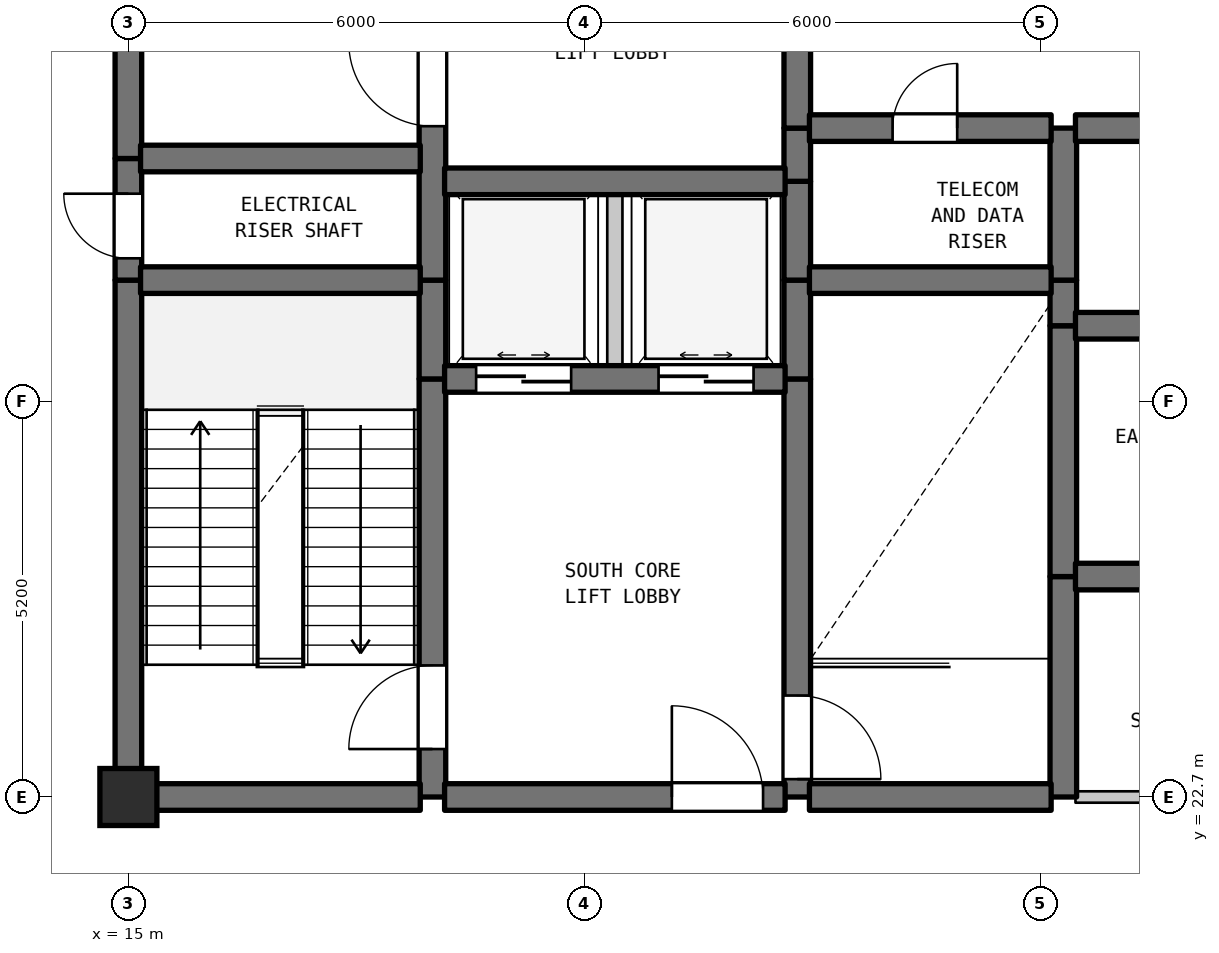
"""IFC4 building model, lengths in metres.
Left out: names, types, materials, properties, quantities, classifications, styles, units other than length and angle.
Written with IfcOpenShell. Run it as: python <this file> out.ifc"""

import sys

from ifc_helpers import new_model, si_unit, direction, frame, frame_2d, origin, origin_2d, place, context, subcontext, project, spatial, rectangle, extrude, element, fill, save


model = new_model("IFC4")
c1 = context("Model", 3, precision=1e-05, world=origin(), true_north=direction((0.0, 1.0)))
c2 = subcontext(c1, "Body", "Model", "MODEL_VIEW")
j1 = project(units=[si_unit("LENGTHUNIT", "METRE"), si_unit("PLANEANGLEUNIT", "RADIAN")], contexts=[c1])
p1 = place(None, origin())
s1 = spatial("IfcSite", under=j1, at=p1, CompositionType="ELEMENT")
p2 = place(p1, origin())
s2 = spatial("IfcBuilding", under=s1, at=p2, CompositionType="ELEMENT")
p3 = place(p2, frame((0.0, 0.0, 237.6)))
s3 = spatial("IfcBuildingStorey", under=s2, at=p3, CompositionType="ELEMENT", Elevation=237.6)
p4 = place(p3, frame((15.0, 22.7, 0.0), z_axis=(0.0, 0.0, 1.0), x_axis=(1.0, 0.0, 0.0)))
e1 = element("IfcColumn", 1, at=p4, inside=s3, PredefinedType="COLUMN", context=c2, shape_type="SweptSolid", body=[
    extrude(rectangle(XDim=0.75, YDim=0.75, at=origin_2d()), origin(), (0.0, 0.0, 1.0), 5.2),
])
p5 = place(p3, frame((3.497, 23.993, 0.0), z_axis=(0.0, 0.0, 1.0), x_axis=(0.358990281293, 0.93334129767, 0.0)))
e2 = element("IfcWall", 2, at=p5, inside=s3, PredefinedType="STANDARD", context=c2, shape_type="SweptSolid", body=[
    extrude(rectangle(XDim=30.669, YDim=0.26, at=frame_2d((15.335, 0.0))), origin(), (0.0, 0.0, 1.0), 4.88),
])
p6 = place(p3, frame((15.0, 22.7, 0.0), z_axis=(0.0, 0.0, 1.0), x_axis=(0.0, 1.0, 0.0)))
e3 = element("IfcWall", 3, at=p6, inside=s3, PredefinedType="SHEAR", context=c2, shape_type="SweptSolid", body=[
    extrude(rectangle(XDim=6.8, YDim=0.35, at=frame_2d((3.4, 0.0))), origin(), (0.0, 0.0, 1.0), 4.88),
])
p7 = place(p3, frame((15.0, 29.5, 0.0), z_axis=(0.0, 0.0, 1.0), x_axis=(0.0, 1.0, 0.0)))
e4 = element("IfcWall", 4, at=p7, inside=s3, PredefinedType="SHEAR", context=c2, shape_type="SweptSolid", body=[
    extrude(rectangle(XDim=1.6, YDim=0.35, at=frame_2d((0.8, 0.0))), origin(), (0.0, 0.0, 1.0), 4.88),
])
p8 = place(p7, frame((0.287, 0.0, 0.0)))
e5 = element("IfcOpeningElement", 5, at=p8, cuts=e4, PredefinedType="OPENING", context=c2, shape_type="SweptSolid", body=[
    extrude(rectangle(XDim=0.85, YDim=2.1, at=frame_2d((0.425, 1.05))), frame((0.0, 0.185, 0.0), z_axis=(0.0, -1.0, 0.0), x_axis=(1.0, 0.0, 0.0)), (0.0, 0.0, 1.0), 0.37),
])
p9 = place(p3, frame((15.0, 31.1, 0.0), z_axis=(0.0, 0.0, 1.0), x_axis=(0.0, 1.0, 0.0)))
e6 = element("IfcWall", 6, at=p9, inside=s3, PredefinedType="SHEAR", context=c2, shape_type="SweptSolid", body=[
    extrude(rectangle(XDim=6.8, YDim=0.35, at=frame_2d((3.4, 0.0))), origin(), (0.0, 0.0, 1.0), 4.88),
])
p10 = place(p3, frame((19.0, 22.7, 0.0), z_axis=(0.0, 0.0, 1.0), x_axis=(0.0, 1.0, 0.0)))
e7 = element("IfcWall", 7, at=p10, inside=s3, PredefinedType="SHEAR", context=c2, shape_type="SweptSolid", body=[
    extrude(rectangle(XDim=5.5, YDim=0.35, at=frame_2d((2.75, 0.0))), origin(), (0.0, 0.0, 1.0), 4.88),
])
p11 = place(p10, frame((0.631, 0.0, 0.0)))
e8 = element("IfcOpeningElement", 8, at=p11, cuts=e7, PredefinedType="OPENING", context=c2, shape_type="SweptSolid", body=[
    extrude(rectangle(XDim=1.1, YDim=2.15, at=frame_2d((0.55, 1.075))), frame((0.0, 0.185, 0.0), z_axis=(0.0, -1.0, 0.0), x_axis=(1.0, 0.0, 0.0)), (0.0, 0.0, 1.0), 0.37),
])
p12 = place(p3, frame((19.0, 28.2, 0.0), z_axis=(0.0, 0.0, 1.0), x_axis=(0.0, 1.0, 0.0)))
e9 = element("IfcWall", 9, at=p12, inside=s3, PredefinedType="SHEAR", context=c2, shape_type="SweptSolid", body=[
    extrude(rectangle(XDim=1.3, YDim=0.35, at=frame_2d((0.65, 0.0))), origin(), (0.0, 0.0, 1.0), 4.88),
])
p13 = place(p3, frame((19.0, 29.5, 0.0), z_axis=(0.0, 0.0, 1.0), x_axis=(0.0, 1.0, 0.0)))
e10 = element("IfcWall", 10, at=p13, inside=s3, PredefinedType="SHEAR", context=c2, shape_type="SweptSolid", body=[
    extrude(rectangle(XDim=5.5, YDim=0.35, at=frame_2d((2.75, 0.0))), origin(), (0.0, 0.0, 1.0), 4.88),
])
p14 = place(p13, frame((2.025, 0.0, 0.0)))
e11 = element("IfcOpeningElement", 11, at=p14, cuts=e10, PredefinedType="OPENING", context=c2, shape_type="SweptSolid", body=[
    extrude(rectangle(XDim=1.1, YDim=2.15, at=frame_2d((0.55, 1.075))), frame((0.0, 0.185, 0.0), z_axis=(0.0, -1.0, 0.0), x_axis=(1.0, 0.0, 0.0)), (0.0, 0.0, 1.0), 0.37),
])
p15 = place(p3, frame((21.4, 28.2, 0.0), z_axis=(0.0, 0.0, 1.0), x_axis=(0.0, 1.0, 0.0)))
e12 = element("IfcWall", 12, at=p15, inside=s3, PredefinedType="STANDARD", context=c2, shape_type="SweptSolid", body=[
    extrude(rectangle(XDim=2.6, YDim=0.2, at=frame_2d((1.3, 0.0))), origin(), (0.0, 0.0, 1.0), 4.88),
])
p16 = place(p3, frame((23.8, 22.7, 0.0), z_axis=(0.0, 0.0, 1.0), x_axis=(0.0, 1.0, 0.0)))
e13 = element("IfcWall", 13, at=p16, inside=s3, PredefinedType="SHEAR", context=c2, shape_type="SweptSolid", body=[
    extrude(rectangle(XDim=5.5, YDim=0.35, at=frame_2d((2.75, 0.0))), origin(), (0.0, 0.0, 1.0), 4.88),
])
p17 = place(p16, frame((0.235, 0.0, 0.0)))
e14 = element("IfcOpeningElement", 14, at=p17, cuts=e13, PredefinedType="OPENING", context=c2, shape_type="SweptSolid", body=[
    extrude(rectangle(XDim=1.1, YDim=2.15, at=frame_2d((0.55, 1.075))), frame((0.0, 0.185, 0.0), z_axis=(0.0, -1.0, 0.0), x_axis=(1.0, 0.0, 0.0)), (0.0, 0.0, 1.0), 0.37),
])
for number, where, z_axis, x_axis in (
    (15, (23.8, 28.2, 0.0), (0.0, 0.0, 1.0), (0.0, 1.0, 0.0)),
    (16, (23.8, 29.5, 0.0), (0.0, 0.0, 1.0), (0.0, 1.0, 0.0)),
):
    element("IfcWall", number, at=place(p3, frame(where, z_axis=z_axis, x_axis=x_axis)), inside=s3, PredefinedType="SHEAR", context=c2, shape_type="SweptSolid", body=[
        extrude(rectangle(XDim=1.3, YDim=0.35, at=frame_2d((0.65, 0.0))), origin(), (0.0, 0.0, 1.0), 4.88),
    ])
p18 = place(p3, frame((23.8, 30.8, 0.0), z_axis=(0.0, 0.0, 1.0), x_axis=(0.0, 1.0, 0.0)))
e17 = element("IfcWall", 17, at=p18, inside=s3, PredefinedType="SHEAR", context=c2, shape_type="SweptSolid", body=[
    extrude(rectangle(XDim=0.7, YDim=0.35, at=frame_2d((0.35, 0.0))), origin(), (0.0, 0.0, 1.0), 4.88),
])
p19 = place(p3, frame((23.8, 31.5, 0.0), z_axis=(0.0, 0.0, 1.0), x_axis=(0.0, 1.0, 0.0)))
e18 = element("IfcWall", 18, at=p19, inside=s3, PredefinedType="SHEAR", context=c2, shape_type="SweptSolid", body=[
    extrude(rectangle(XDim=3.5, YDim=0.35, at=frame_2d((1.75, 0.0))), origin(), (0.0, 0.0, 1.0), 4.88),
])
p20 = place(p19, frame((1.127, 0.0, 0.0)))
e19 = element("IfcOpeningElement", 19, at=p20, cuts=e18, PredefinedType="OPENING", context=c2, shape_type="SweptSolid", body=[
    extrude(rectangle(XDim=1.1, YDim=2.15, at=frame_2d((0.55, 1.075))), frame((0.0, 0.185, 0.0), z_axis=(0.0, -1.0, 0.0), x_axis=(1.0, 0.0, 0.0)), (0.0, 0.0, 1.0), 0.37),
])
p21 = place(p3, frame((27.3, 22.7, 0.0), z_axis=(0.0, 0.0, 1.0), x_axis=(0.0, 1.0, 0.0)))
e20 = element("IfcWall", 20, at=p21, inside=s3, PredefinedType="SHEAR", context=c2, shape_type="SweptSolid", body=[
    extrude(rectangle(XDim=2.9, YDim=0.35, at=frame_2d((1.45, 0.0))), origin(), (0.0, 0.0, 1.0), 4.88),
])
p22 = place(p3, frame((27.3, 25.6, 0.0), z_axis=(0.0, 0.0, 1.0), x_axis=(0.0, 1.0, 0.0)))
e21 = element("IfcWall", 21, at=p22, inside=s3, PredefinedType="SHEAR", context=c2, shape_type="SweptSolid", body=[
    extrude(rectangle(XDim=3.3, YDim=0.35, at=frame_2d((1.65, 0.0))), origin(), (0.0, 0.0, 1.0), 4.88),
])
p23 = place(p3, frame((27.3, 28.9, 0.0), z_axis=(0.0, 0.0, 1.0), x_axis=(0.0, 1.0, 0.0)))
e22 = element("IfcWall", 22, at=p23, inside=s3, PredefinedType="SHEAR", context=c2, shape_type="SweptSolid", body=[
    extrude(rectangle(XDim=0.6, YDim=0.35, at=frame_2d((0.3, 0.0))), origin(), (0.0, 0.0, 1.0), 4.88),
])
p24 = place(p3, frame((27.3, 29.5, 0.0), z_axis=(0.0, 0.0, 1.0), x_axis=(0.0, 1.0, 0.0)))
e23 = element("IfcWall", 23, at=p24, inside=s3, PredefinedType="SHEAR", context=c2, shape_type="SweptSolid", body=[
    extrude(rectangle(XDim=2.0, YDim=0.35, at=frame_2d((1.0, 0.0))), origin(), (0.0, 0.0, 1.0), 4.88),
])
p25 = place(p3, frame((15.16, 22.7, 0.0), z_axis=(0.0, 0.0, 1.0), x_axis=(1.0, 0.0, 0.0)))
e24 = element("IfcWall", 24, at=p25, inside=s3, PredefinedType="SHEAR", context=c2, shape_type="SweptSolid", body=[
    extrude(rectangle(XDim=3.68, YDim=0.35, at=frame_2d((1.84, 0.0))), origin(), (0.0, 0.0, 1.0), 4.88),
])
p26 = place(p3, frame((19.16, 22.7, 0.0), z_axis=(0.0, 0.0, 1.0), x_axis=(1.0, 0.0, 0.0)))
e25 = element("IfcWall", 25, at=p26, inside=s3, PredefinedType="SHEAR", context=c2, shape_type="SweptSolid", body=[
    extrude(rectangle(XDim=4.48, YDim=0.35, at=frame_2d((2.24, 0.0))), origin(), (0.0, 0.0, 1.0), 4.88),
])
p27 = place(p26, frame((2.99, 0.0, 0.0)))
e26 = element("IfcOpeningElement", 26, at=p27, cuts=e25, PredefinedType="OPENING", context=c2, shape_type="SweptSolid", body=[
    extrude(rectangle(XDim=1.2, YDim=2.2, at=frame_2d((0.6, 1.1))), frame((0.0, 0.185, 0.0), z_axis=(0.0, -1.0, 0.0), x_axis=(1.0, 0.0, 0.0)), (0.0, 0.0, 1.0), 0.37),
])
p28 = place(p3, frame((23.96, 22.7, 0.0), z_axis=(0.0, 0.0, 1.0), x_axis=(1.0, 0.0, 0.0)))
e27 = element("IfcWall", 27, at=p28, inside=s3, PredefinedType="SHEAR", context=c2, shape_type="SweptSolid", body=[
    extrude(rectangle(XDim=3.18, YDim=0.35, at=frame_2d((1.59, 0.0))), origin(), (0.0, 0.0, 1.0), 4.88),
])
p29 = place(p3, frame((27.46, 22.7, 0.0), z_axis=(0.0, 0.0, 1.0), x_axis=(1.0, 0.0, 0.0)))
e28 = element("IfcWall", 28, at=p29, inside=s3, PredefinedType="STANDARD", context=c2, shape_type="SweptSolid", body=[
    extrude(rectangle(XDim=3.28, YDim=0.15, at=frame_2d((1.64, 0.0))), origin(), (0.0, 0.0, 1.0), 4.88),
])
p30 = place(p3, frame((27.46, 25.6, 0.0), z_axis=(0.0, 0.0, 1.0), x_axis=(1.0, 0.0, 0.0)))
e29 = element("IfcWall", 29, at=p30, inside=s3, PredefinedType="SHEAR", context=c2, shape_type="SweptSolid", body=[
    extrude(rectangle(XDim=3.18, YDim=0.35, at=frame_2d((1.59, 0.0))), origin(), (0.0, 0.0, 1.0), 4.88),
])
p31 = place(p30, frame((1.115, 0.0, 0.0)))
e30 = element("IfcOpeningElement", 30, at=p31, cuts=e29, PredefinedType="OPENING", context=c2, shape_type="SweptSolid", body=[
    extrude(rectangle(XDim=0.95, YDim=2.15, at=frame_2d((0.475, 1.075))), frame((0.0, 0.185, 0.0), z_axis=(0.0, -1.0, 0.0), x_axis=(1.0, 0.0, 0.0)), (0.0, 0.0, 1.0), 0.37),
])
p32 = place(p3, frame((19.16, 28.2, 0.0), z_axis=(0.0, 0.0, 1.0), x_axis=(1.0, 0.0, 0.0)))
e31 = element("IfcWall", 31, at=p32, inside=s3, PredefinedType="SHEAR", context=c2, shape_type="SweptSolid", body=[
    extrude(rectangle(XDim=4.48, YDim=0.35, at=frame_2d((2.24, 0.0))), origin(), (0.0, 0.0, 1.0), 4.88),
])
p33 = place(p32, frame((0.415, 0.0, 0.0)))
e32 = element("IfcOpeningElement", 32, at=p33, cuts=e31, PredefinedType="OPENING", context=c2, shape_type="SweptSolid", body=[
    extrude(rectangle(XDim=1.25, YDim=2.2, at=frame_2d((0.625, 1.1))), frame((0.0, 0.185, 0.0), z_axis=(0.0, -1.0, 0.0), x_axis=(1.0, 0.0, 0.0)), (0.0, 0.0, 1.0), 0.37),
])
p34 = place(p32, frame((2.815, 0.0, 0.0)))
e33 = element("IfcOpeningElement", 33, at=p34, cuts=e31, PredefinedType="OPENING", context=c2, shape_type="SweptSolid", body=[
    extrude(rectangle(XDim=1.25, YDim=2.2, at=frame_2d((0.625, 1.1))), frame((0.0, 0.185, 0.0), z_axis=(0.0, -1.0, 0.0), x_axis=(1.0, 0.0, 0.0)), (0.0, 0.0, 1.0), 0.37),
])
p35 = place(p3, frame((27.46, 28.9, 0.0), z_axis=(0.0, 0.0, 1.0), x_axis=(1.0, 0.0, 0.0)))
e34 = element("IfcWall", 34, at=p35, inside=s3, PredefinedType="SHEAR", context=c2, shape_type="SweptSolid", body=[
    extrude(rectangle(XDim=3.18, YDim=0.35, at=frame_2d((1.59, 0.0))), origin(), (0.0, 0.0, 1.0), 4.88),
])
p36 = place(p35, frame((1.115, 0.0, 0.0)))
e35 = element("IfcOpeningElement", 35, at=p36, cuts=e34, PredefinedType="OPENING", context=c2, shape_type="SweptSolid", body=[
    extrude(rectangle(XDim=0.95, YDim=2.15, at=frame_2d((0.475, 1.075))), frame((0.0, 0.185, 0.0), z_axis=(0.0, -1.0, 0.0), x_axis=(1.0, 0.0, 0.0)), (0.0, 0.0, 1.0), 0.37),
])
p37 = place(p3, frame((15.16, 29.5, 0.0), z_axis=(0.0, 0.0, 1.0), x_axis=(1.0, 0.0, 0.0)))
e36 = element("IfcWall", 36, at=p37, inside=s3, PredefinedType="SHEAR", context=c2, shape_type="SweptSolid", body=[
    extrude(rectangle(XDim=3.68, YDim=0.35, at=frame_2d((1.84, 0.0))), origin(), (0.0, 0.0, 1.0), 4.88),
])
p38 = place(p3, frame((23.96, 29.5, 0.0), z_axis=(0.0, 0.0, 1.0), x_axis=(1.0, 0.0, 0.0)))
e37 = element("IfcWall", 37, at=p38, inside=s3, PredefinedType="SHEAR", context=c2, shape_type="SweptSolid", body=[
    extrude(rectangle(XDim=3.18, YDim=0.35, at=frame_2d((1.59, 0.0))), origin(), (0.0, 0.0, 1.0), 4.88),
])
p39 = place(p3, frame((19.16, 30.8, 0.0), z_axis=(0.0, 0.0, 1.0), x_axis=(1.0, 0.0, 0.0)))
e38 = element("IfcWall", 38, at=p39, inside=s3, PredefinedType="SHEAR", context=c2, shape_type="SweptSolid", body=[
    extrude(rectangle(XDim=4.48, YDim=0.35, at=frame_2d((2.24, 0.0))), origin(), (0.0, 0.0, 1.0), 4.88),
])
p40 = place(p3, frame((15.16, 31.1, 0.0), z_axis=(0.0, 0.0, 1.0), x_axis=(1.0, 0.0, 0.0)))
e39 = element("IfcWall", 39, at=p40, inside=s3, PredefinedType="SHEAR", context=c2, shape_type="SweptSolid", body=[
    extrude(rectangle(XDim=3.68, YDim=0.35, at=frame_2d((1.84, 0.0))), origin(), (0.0, 0.0, 1.0), 4.88),
])
p41 = place(p3, frame((23.96, 31.5, 0.0), z_axis=(0.0, 0.0, 1.0), x_axis=(1.0, 0.0, 0.0)))
e40 = element("IfcWall", 40, at=p41, inside=s3, PredefinedType="SHEAR", context=c2, shape_type="SweptSolid", body=[
    extrude(rectangle(XDim=3.18, YDim=0.35, at=frame_2d((1.59, 0.0))), origin(), (0.0, 0.0, 1.0), 4.88),
])
p42 = place(p41, frame((1.094, 0.0, 0.0)))
e41 = element("IfcOpeningElement", 41, at=p42, cuts=e40, PredefinedType="OPENING", context=c2, shape_type="SweptSolid", body=[
    extrude(rectangle(XDim=0.85, YDim=2.1, at=frame_2d((0.425, 1.05))), frame((0.0, 0.185, 0.0), z_axis=(0.0, -1.0, 0.0), x_axis=(1.0, 0.0, 0.0)), (0.0, 0.0, 1.0), 0.37),
])
p43 = place(p3, frame((27.46, 31.5, 0.0), z_axis=(0.0, 0.0, 1.0), x_axis=(1.0, 0.0, 0.0)))
e42 = element("IfcWall", 42, at=p43, inside=s3, PredefinedType="SHEAR", context=c2, shape_type="SweptSolid", body=[
    extrude(rectangle(XDim=3.18, YDim=0.35, at=frame_2d((1.59, 0.0))), origin(), (0.0, 0.0, 1.0), 4.88),
])
p44 = place(p3, frame((17.439, 9.865, 0.0), z_axis=(0.0, 0.0, 1.0), x_axis=(-0.747407065455, 0.664366373703, 0.0)))
e43 = element("IfcWall", 43, at=p44, inside=s3, PredefinedType="STANDARD", context=c2, shape_type="SweptSolid", body=[
    extrude(rectangle(XDim=17.934, YDim=0.26, at=frame_2d((8.967, 0.0))), origin(), (0.0, 0.0, 1.0), 4.88),
])
p45 = place(p8, origin())
e44 = element("IfcDoor", 44, at=p45, inside=s3, OperationType="SINGLE_SWING_RIGHT", PredefinedType="DOOR", context=c2, shape_type="SweptSolid", body=[
    extrude(rectangle(XDim=0.85, YDim=2.1, at=frame_2d((0.425, 1.05))), frame((0.0, 0.025, 0.0), z_axis=(0.0, -1.0, 0.0), x_axis=(1.0, 0.0, 0.0)), (0.0, 0.0, 1.0), 0.05),
])
fill(e5, e44)
p46 = place(p11, origin())
e45 = element("IfcDoor", 45, at=p46, inside=s3, OperationType="SINGLE_SWING_LEFT", PredefinedType="DOOR", context=c2, shape_type="SweptSolid", body=[
    extrude(rectangle(XDim=1.1, YDim=2.15, at=frame_2d((0.55, 1.075))), frame((0.0, 0.025, 0.0), z_axis=(0.0, -1.0, 0.0), x_axis=(1.0, 0.0, 0.0)), (0.0, 0.0, 1.0), 0.05),
])
fill(e8, e45)
p47 = place(p14, origin())
e46 = element("IfcDoor", 46, at=p47, inside=s3, OperationType="SINGLE_SWING_RIGHT", PredefinedType="DOOR", context=c2, shape_type="SweptSolid", body=[
    extrude(rectangle(XDim=1.1, YDim=2.15, at=frame_2d((0.55, 1.075))), frame((0.0, 0.025, 0.0), z_axis=(0.0, -1.0, 0.0), x_axis=(1.0, 0.0, 0.0)), (0.0, 0.0, 1.0), 0.05),
])
fill(e11, e46)
p48 = place(p17, frame((1.1, 0.0, 0.0), z_axis=(0.0, 0.0, 1.0), x_axis=(-1.0, 0.0, 0.0)))
e47 = element("IfcDoor", 47, at=p48, inside=s3, OperationType="SINGLE_SWING_LEFT", PredefinedType="DOOR", context=c2, shape_type="SweptSolid", body=[
    extrude(rectangle(XDim=1.1, YDim=2.15, at=frame_2d((0.55, 1.075))), frame((0.0, 0.025, 0.0), z_axis=(0.0, -1.0, 0.0), x_axis=(1.0, 0.0, 0.0)), (0.0, 0.0, 1.0), 0.05),
])
fill(e14, e47)
p49 = place(p27, origin())
e48 = element("IfcDoor", 48, at=p49, inside=s3, OperationType="SINGLE_SWING_LEFT", PredefinedType="DOOR", context=c2, shape_type="SweptSolid", body=[
    extrude(rectangle(XDim=1.2, YDim=2.2, at=frame_2d((0.6, 1.1))), frame((0.0, 0.025, 0.0), z_axis=(0.0, -1.0, 0.0), x_axis=(1.0, 0.0, 0.0)), (0.0, 0.0, 1.0), 0.05),
])
fill(e26, e48)
p50 = place(p33, origin())
e49 = element("IfcDoor", 49, at=p50, inside=s3, OperationType="DOUBLE_DOOR_SLIDING", PredefinedType="DOOR", context=c2, shape_type="SweptSolid", body=[
    extrude(rectangle(XDim=1.25, YDim=2.2, at=frame_2d((0.625, 1.1))), frame((0.0, 0.025, 0.0), z_axis=(0.0, -1.0, 0.0), x_axis=(1.0, 0.0, 0.0)), (0.0, 0.0, 1.0), 0.05),
])
fill(e32, e49)
p51 = place(p34, origin())
e50 = element("IfcDoor", 50, at=p51, inside=s3, OperationType="DOUBLE_DOOR_SLIDING", PredefinedType="DOOR", context=c2, shape_type="SweptSolid", body=[
    extrude(rectangle(XDim=1.25, YDim=2.2, at=frame_2d((0.625, 1.1))), frame((0.0, 0.025, 0.0), z_axis=(0.0, -1.0, 0.0), x_axis=(1.0, 0.0, 0.0)), (0.0, 0.0, 1.0), 0.05),
])
fill(e33, e50)
p52 = place(p42, origin())
e51 = element("IfcDoor", 51, at=p52, inside=s3, OperationType="SINGLE_SWING_RIGHT", PredefinedType="DOOR", context=c2, shape_type="SweptSolid", body=[
    extrude(rectangle(XDim=0.85, YDim=2.1, at=frame_2d((0.425, 1.05))), frame((0.0, 0.025, 0.0), z_axis=(0.0, -1.0, 0.0), x_axis=(1.0, 0.0, 0.0)), (0.0, 0.0, 1.0), 0.05),
])
fill(e41, e51)
save(model, sys.argv[1])
